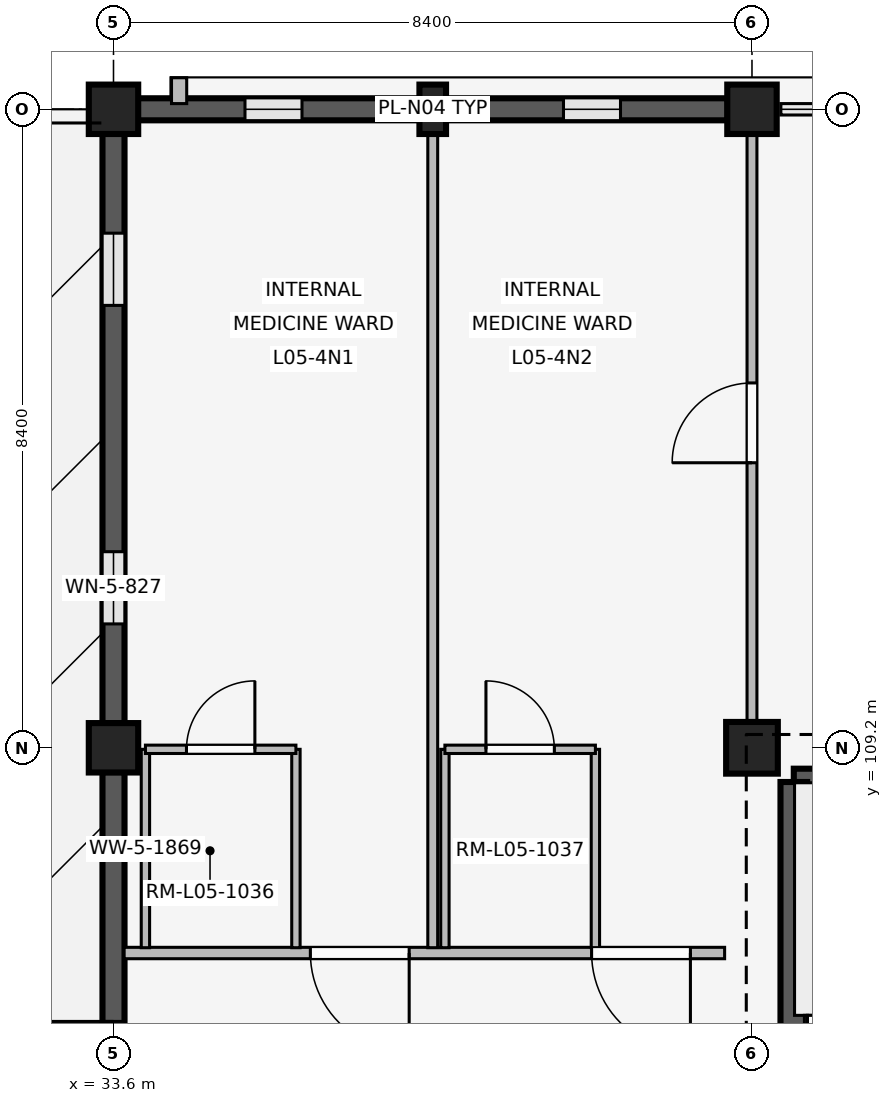
"""IFC4 building model, lengths in metres.
Left out: names, types, materials, properties, quantities, classifications, styles, units other than length and angle.
Written with IfcOpenShell. Run it as: python <this file> out.ifc"""

import sys

from ifc_helpers import new_model, si_unit, direction, frame, frame_2d, origin, origin_2d, place, context, subcontext, project, spatial, rectangle, extrude, element, fill, save


model = new_model("IFC4")
c1 = context("Model", 3, precision=1e-05, world=origin(), true_north=direction((0.0, 1.0)))
c2 = subcontext(c1, "Body", "Model", "MODEL_VIEW")
j1 = project(units=[si_unit("LENGTHUNIT", "METRE"), si_unit("PLANEANGLEUNIT", "RADIAN")], contexts=[c1])
p1 = place(None, origin())
s1 = spatial("IfcSite", under=j1, at=p1, CompositionType="ELEMENT")
p2 = place(p1, origin())
s2 = spatial("IfcBuilding", under=s1, at=p2, CompositionType="ELEMENT")
p3 = place(p2, frame((0.0, 0.0, 20.4)))
s3 = spatial("IfcBuildingStorey", under=s2, at=p3, CompositionType="ELEMENT", Elevation=20.4)
for number, where, z_axis, x_axis in (
    (1, (33.6, 109.2, 0.0), (0.0, 0.0, 1.0), (1.0, 0.0, 0.0)),
    (2, (33.6, 117.6, 0.0), (0.0, 0.0, 1.0), (1.0, 0.0, 0.0)),
):
    element("IfcColumn", number, at=place(p3, frame(where, z_axis=z_axis, x_axis=x_axis)), inside=s3, PredefinedType="COLUMN", context=c2, shape_type="SweptSolid", body=[
        extrude(rectangle(XDim=0.65, YDim=0.65, at=origin_2d()), origin(), (0.0, 0.0, 1.0), 4.2),
    ])
p4 = place(p3, frame((42.0, 109.2, 0.0), z_axis=(0.0, 0.0, 1.0), x_axis=(1.0, 0.0, 0.0)))
e3 = element("IfcColumn", 3, at=p4, inside=s3, PredefinedType="COLUMN", context=c2, shape_type="SweptSolid", body=[
    extrude(rectangle(XDim=0.68, YDim=0.68, at=origin_2d()), origin(), (0.0, 0.0, 1.0), 4.2),
])
p5 = place(p3, frame((42.0, 117.6, 0.0), z_axis=(0.0, 0.0, 1.0), x_axis=(1.0, 0.0, 0.0)))
e4 = element("IfcColumn", 4, at=p5, inside=s3, PredefinedType="COLUMN", context=c2, shape_type="SweptSolid", body=[
    extrude(rectangle(XDim=0.65, YDim=0.65, at=origin_2d()), origin(), (0.0, 0.0, 1.0), 4.2),
])
p6 = place(p3, frame((37.8, 117.6, 0.0), z_axis=(0.0, 0.0, 1.0), x_axis=(1.0, 0.0, 0.0)))
e5 = element("IfcColumn", 5, at=p6, inside=s3, PredefinedType="PILASTER", context=c2, shape_type="SweptSolid", body=[
    extrude(rectangle(XDim=0.35, YDim=0.65, at=origin_2d()), origin(), (0.0, 0.0, 1.0), 4.2),
])
p7 = place(p3, frame((33.6, 101.12, 0.0), z_axis=(0.0, 0.0, 1.0), x_axis=(0.0, 1.0, 0.0)))
e6 = element("IfcWall", 6, at=p7, inside=s3, PredefinedType="SOLIDWALL", context=c2, shape_type="SweptSolid", body=[
    extrude(rectangle(XDim=7.76, YDim=0.29, at=frame_2d((3.88, 0.0))), origin(), (0.0, 0.0, 1.0), 3.34),
])
p8 = place(p7, frame((3.28, 0.0, 0.0)))
e7 = element("IfcOpeningElement", 7, at=p8, cuts=e6, PredefinedType="OPENING", context=c2, shape_type="SweptSolid", body=[
    extrude(rectangle(XDim=1.2, YDim=2.25, at=frame_2d((0.6, 1.125))), frame((0.0, 0.155, 0.0), z_axis=(0.0, -1.0, 0.0), x_axis=(1.0, 0.0, 0.0)), (0.0, 0.0, 1.0), 0.31),
])
p9 = place(p3, frame((33.92, 117.6, 0.0), z_axis=(0.0, 0.0, 1.0), x_axis=(1.0, 0.0, 0.0)))
e8 = element("IfcWall", 8, at=p9, inside=s3, PredefinedType="SOLIDWALL", context=c2, shape_type="SweptSolid", body=[
    extrude(rectangle(XDim=7.76, YDim=0.29, at=frame_2d((3.88, 0.0))), origin(), (0.0, 0.0, 1.0), 3.34),
])
p10 = place(p9, frame((1.41, 0.0, 0.85)))
e9 = element("IfcOpeningElement", 9, at=p10, cuts=e8, PredefinedType="OPENING", context=c2, shape_type="SweptSolid", body=[
    extrude(rectangle(XDim=0.75, YDim=1.85, at=frame_2d((0.375, 0.925))), frame((0.0, 0.155, 0.0), z_axis=(0.0, -1.0, 0.0), x_axis=(1.0, 0.0, 0.0)), (0.0, 0.0, 1.0), 0.31),
])
p11 = place(p9, frame((5.6, 0.0, 0.85)))
e10 = element("IfcOpeningElement", 10, at=p11, cuts=e8, PredefinedType="OPENING", context=c2, shape_type="SweptSolid", body=[
    extrude(rectangle(XDim=0.75, YDim=1.85, at=frame_2d((0.375, 0.925))), frame((0.0, 0.155, 0.0), z_axis=(0.0, -1.0, 0.0), x_axis=(1.0, 0.0, 0.0)), (0.0, 0.0, 1.0), 0.31),
])
p12 = place(p3, frame((34.463, 117.675, 0.0), z_axis=(0.0, 0.0, 1.0), x_axis=(0.0, 1.0, 0.0)))
e11 = element("IfcWall", 11, at=p12, inside=s3, PredefinedType="ELEMENTEDWALL", context=c2, shape_type="SweptSolid", body=[
    extrude(rectangle(XDim=0.34, YDim=0.2, at=frame_2d((0.17, 0.0))), origin(), (0.0, 0.0, 1.0), 3.32),
])
p13 = place(p3, frame((33.6, 109.52, 0.0), z_axis=(0.0, 0.0, 1.0), x_axis=(0.0, 1.0, 0.0)))
e12 = element("IfcWall", 12, at=p13, inside=s3, PredefinedType="SOLIDWALL", context=c2, shape_type="SweptSolid", body=[
    extrude(rectangle(XDim=7.76, YDim=0.29, at=frame_2d((3.88, 0.0))), origin(), (0.0, 0.0, 1.0), 3.34),
])
p14 = place(p13, frame((1.31, 0.0, 0.85)))
e13 = element("IfcOpeningElement", 13, at=p14, cuts=e12, PredefinedType="OPENING", context=c2, shape_type="SweptSolid", body=[
    extrude(rectangle(XDim=0.95, YDim=1.6, at=frame_2d((0.475, 0.8))), frame((0.0, 0.155, 0.0), z_axis=(0.0, -1.0, 0.0), x_axis=(1.0, 0.0, 0.0)), (0.0, 0.0, 1.0), 0.31),
])
p15 = place(p13, frame((5.5, 0.0, 0.85)))
e14 = element("IfcOpeningElement", 14, at=p15, cuts=e12, PredefinedType="OPENING", context=c2, shape_type="SweptSolid", body=[
    extrude(rectangle(XDim=0.95, YDim=1.6, at=frame_2d((0.475, 0.8))), frame((0.0, 0.155, 0.0), z_axis=(0.0, -1.0, 0.0), x_axis=(1.0, 0.0, 0.0)), (0.0, 0.0, 1.0), 0.31),
])
p16 = place(p3, frame((42.55, 108.75, 0.0), z_axis=(0.0, 0.0, 1.0), x_axis=(1.0, 0.0, 0.0)))
e15 = element("IfcWall", 15, at=p16, inside=s3, PredefinedType="SHEAR", context=c2, shape_type="SweptSolid", body=[
    extrude(rectangle(XDim=7.5, YDim=0.35, at=frame_2d((3.75, 0.0))), origin(), (0.0, 0.0, 1.0), 3.92),
])
p17 = place(p3, frame((42.55, 101.2, 0.0), z_axis=(0.0, 0.0, 1.0), x_axis=(0.0, 1.0, 0.0)))
e16 = element("IfcWall", 16, at=p17, inside=s3, PredefinedType="SHEAR", context=c2, shape_type="SweptSolid", body=[
    extrude(rectangle(XDim=7.55, YDim=0.35, at=frame_2d((3.775, 0.0))), origin(), (0.0, 0.0, 1.0), 3.92),
])
p18 = place(p17, frame((0.28, 0.0, 0.0)))
e17 = element("IfcOpeningElement", 17, at=p18, cuts=e16, PredefinedType="OPENING", context=c2, shape_type="SweptSolid", body=[
    extrude(rectangle(XDim=1.0, YDim=2.15, at=frame_2d((0.5, 1.075))), frame((0.0, 0.185, 0.0), z_axis=(0.0, -1.0, 0.0), x_axis=(1.0, 0.0, 0.0)), (0.0, 0.0, 1.0), 0.37),
])
p19 = place(p3, frame((41.64, 106.5, 0.0), z_axis=(0.0, 0.0, 1.0), x_axis=(-1.0, 0.0, 0.0)))
e18 = element("IfcWall", 18, at=p19, inside=s3, PredefinedType="PARTITIONING", context=c2, shape_type="SweptSolid", body=[
    extrude(rectangle(XDim=7.9, YDim=0.15, at=frame_2d((3.95, 0.0))), origin(), (0.0, 0.0, 1.0), 3.32),
])
p20 = place(p19, frame((0.45, 0.0, 0.0)))
e19 = element("IfcOpeningElement", 19, at=p20, cuts=e18, PredefinedType="OPENING", context=c2, shape_type="SweptSolid", body=[
    extrude(rectangle(XDim=1.3, YDim=2.25, at=frame_2d((0.65, 1.125))), frame((0.0, 0.085, 0.0), z_axis=(0.0, -1.0, 0.0), x_axis=(1.0, 0.0, 0.0)), (0.0, 0.0, 1.0), 0.17),
])
p21 = place(p19, frame((4.15, 0.0, 0.0)))
e20 = element("IfcOpeningElement", 20, at=p21, cuts=e18, PredefinedType="OPENING", context=c2, shape_type="SweptSolid", body=[
    extrude(rectangle(XDim=1.3, YDim=2.25, at=frame_2d((0.65, 1.125))), frame((0.0, 0.085, 0.0), z_axis=(0.0, -1.0, 0.0), x_axis=(1.0, 0.0, 0.0)), (0.0, 0.0, 1.0), 0.17),
])
p22 = place(p3, frame((37.8, 106.57, 0.0), z_axis=(0.0, 0.0, 1.0), x_axis=(0.0, 1.0, 0.0)))
e21 = element("IfcWall", 21, at=p22, inside=s3, PredefinedType="PARTITIONING", context=c2, shape_type="SweptSolid", body=[
    extrude(rectangle(XDim=10.93, YDim=0.13, at=frame_2d((5.465, 0.0))), origin(), (0.0, 0.0, 1.0), 3.32),
])
for number, where, z_axis, x_axis in (
    (22, (34.02, 106.57, 0.0), (0.0, 0.0, 1.0), (0.0, 1.0, 0.0)),
    (23, (36.0, 106.57, 0.0), (0.0, 0.0, 1.0), (0.0, 1.0, 0.0)),
):
    element("IfcWall", number, at=place(p3, frame(where, z_axis=z_axis, x_axis=x_axis)), inside=s3, PredefinedType="PARTITIONING", context=c2, shape_type="SweptSolid", body=[
        extrude(rectangle(XDim=2.61, YDim=0.11, at=frame_2d((1.305, 0.0))), origin(), (0.0, 0.0, 1.0), 3.32),
    ])
p23 = place(p3, frame((34.02, 109.18, 0.0), z_axis=(0.0, 0.0, 1.0), x_axis=(1.0, 0.0, 0.0)))
e24 = element("IfcWall", 24, at=p23, inside=s3, PredefinedType="PARTITIONING", context=c2, shape_type="SweptSolid", body=[
    extrude(rectangle(XDim=1.98, YDim=0.11, at=frame_2d((0.99, 0.0))), origin(), (0.0, 0.0, 1.0), 3.32),
])
p24 = place(p23, frame((0.54, 0.0, 0.0)))
e25 = element("IfcOpeningElement", 25, at=p24, cuts=e24, PredefinedType="OPENING", context=c2, shape_type="SweptSolid", body=[
    extrude(rectangle(XDim=0.9, YDim=2.1, at=frame_2d((0.45, 1.05))), frame((0.0, 0.065, 0.0), z_axis=(0.0, -1.0, 0.0), x_axis=(1.0, 0.0, 0.0)), (0.0, 0.0, 1.0), 0.13),
])
for number, where, z_axis, x_axis in (
    (26, (37.96, 106.57, 0.0), (0.0, 0.0, 1.0), (0.0, 1.0, 0.0)),
    (27, (39.94, 106.57, 0.0), (0.0, 0.0, 1.0), (0.0, 1.0, 0.0)),
):
    element("IfcWall", number, at=place(p3, frame(where, z_axis=z_axis, x_axis=x_axis)), inside=s3, PredefinedType="PARTITIONING", context=c2, shape_type="SweptSolid", body=[
        extrude(rectangle(XDim=2.61, YDim=0.11, at=frame_2d((1.305, 0.0))), origin(), (0.0, 0.0, 1.0), 3.32),
    ])
p25 = place(p3, frame((37.96, 109.18, 0.0), z_axis=(0.0, 0.0, 1.0), x_axis=(1.0, 0.0, 0.0)))
e28 = element("IfcWall", 28, at=p25, inside=s3, PredefinedType="PARTITIONING", context=c2, shape_type="SweptSolid", body=[
    extrude(rectangle(XDim=1.98, YDim=0.11, at=frame_2d((0.99, 0.0))), origin(), (0.0, 0.0, 1.0), 3.32),
])
p26 = place(p25, frame((0.54, 0.0, 0.0)))
e29 = element("IfcOpeningElement", 29, at=p26, cuts=e28, PredefinedType="OPENING", context=c2, shape_type="SweptSolid", body=[
    extrude(rectangle(XDim=0.9, YDim=2.1, at=frame_2d((0.45, 1.05))), frame((0.0, 0.065, 0.0), z_axis=(0.0, -1.0, 0.0), x_axis=(1.0, 0.0, 0.0)), (0.0, 0.0, 1.0), 0.13),
])
p27 = place(p3, frame((42.0, 109.55, 0.0), z_axis=(0.0, 0.0, 1.0), x_axis=(0.0, 1.0, 0.0)))
e30 = element("IfcWall", 30, at=p27, inside=s3, PredefinedType="PARTITIONING", context=c2, shape_type="SweptSolid", body=[
    extrude(rectangle(XDim=7.91, YDim=0.13, at=frame_2d((3.955, 0.0))), origin(), (0.0, 0.0, 1.0), 3.32),
])
p28 = place(p27, frame((3.4, 0.0, 0.0)))
e31 = element("IfcOpeningElement", 31, at=p28, cuts=e30, PredefinedType="OPENING", context=c2, shape_type="SweptSolid", body=[
    extrude(rectangle(XDim=1.05, YDim=2.2, at=frame_2d((0.525, 1.1))), frame((0.0, 0.075, 0.0), z_axis=(0.0, -1.0, 0.0), x_axis=(1.0, 0.0, 0.0)), (0.0, 0.0, 1.0), 0.15),
])
p29 = place(p8, origin())
e32 = element("IfcDoor", 32, at=p29, inside=s3, OperationType="SINGLE_SWING_RIGHT", PredefinedType="DOOR", context=c2, shape_type="SweptSolid", body=[
    extrude(rectangle(XDim=1.2, YDim=2.25, at=frame_2d((0.6, 1.125))), frame((0.0, 0.025, 0.0), z_axis=(0.0, -1.0, 0.0), x_axis=(1.0, 0.0, 0.0)), (0.0, 0.0, 1.0), 0.05),
])
fill(e7, e32)
p30 = place(p10, origin())
e33 = element("IfcWindow", 33, at=p30, inside=s3, PartitioningType="SINGLE_PANEL", PredefinedType="WINDOW", context=c2, shape_type="SweptSolid", body=[
    extrude(rectangle(XDim=0.75, YDim=1.85, at=frame_2d((0.375, 0.925))), frame((0.0, 0.03, 0.0), z_axis=(0.0, -1.0, 0.0), x_axis=(1.0, 0.0, 0.0)), (0.0, 0.0, 1.0), 0.06),
])
fill(e9, e33)
p31 = place(p11, origin())
e34 = element("IfcWindow", 34, at=p31, inside=s3, PartitioningType="SINGLE_PANEL", PredefinedType="WINDOW", context=c2, shape_type="SweptSolid", body=[
    extrude(rectangle(XDim=0.75, YDim=1.85, at=frame_2d((0.375, 0.925))), frame((0.0, 0.03, 0.0), z_axis=(0.0, -1.0, 0.0), x_axis=(1.0, 0.0, 0.0)), (0.0, 0.0, 1.0), 0.06),
])
fill(e10, e34)
p32 = place(p14, origin())
e35 = element("IfcWindow", 35, at=p32, inside=s3, PartitioningType="SINGLE_PANEL", PredefinedType="WINDOW", context=c2, shape_type="SweptSolid", body=[
    extrude(rectangle(XDim=0.95, YDim=1.6, at=frame_2d((0.475, 0.8))), frame((0.0, 0.03, 0.0), z_axis=(0.0, -1.0, 0.0), x_axis=(1.0, 0.0, 0.0)), (0.0, 0.0, 1.0), 0.06),
])
fill(e13, e35)
p33 = place(p15, origin())
e36 = element("IfcWindow", 36, at=p33, inside=s3, PartitioningType="SINGLE_PANEL", PredefinedType="WINDOW", context=c2, shape_type="SweptSolid", body=[
    extrude(rectangle(XDim=0.95, YDim=1.6, at=frame_2d((0.475, 0.8))), frame((0.0, 0.03, 0.0), z_axis=(0.0, -1.0, 0.0), x_axis=(1.0, 0.0, 0.0)), (0.0, 0.0, 1.0), 0.06),
])
fill(e14, e36)
p34 = place(p20, origin())
e37 = element("IfcDoor", 37, at=p34, inside=s3, OperationType="SINGLE_SWING_LEFT", PredefinedType="DOOR", context=c2, shape_type="SweptSolid", body=[
    extrude(rectangle(XDim=1.3, YDim=2.25, at=frame_2d((0.65, 1.125))), frame((0.0, 0.025, 0.0), z_axis=(0.0, -1.0, 0.0), x_axis=(1.0, 0.0, 0.0)), (0.0, 0.0, 1.0), 0.05),
])
fill(e19, e37)
p35 = place(p21, origin())
e38 = element("IfcDoor", 38, at=p35, inside=s3, OperationType="SINGLE_SWING_LEFT", PredefinedType="DOOR", context=c2, shape_type="SweptSolid", body=[
    extrude(rectangle(XDim=1.3, YDim=2.25, at=frame_2d((0.65, 1.125))), frame((0.0, 0.025, 0.0), z_axis=(0.0, -1.0, 0.0), x_axis=(1.0, 0.0, 0.0)), (0.0, 0.0, 1.0), 0.05),
])
fill(e20, e38)
p36 = place(p24, origin())
e39 = element("IfcDoor", 39, at=p36, inside=s3, OperationType="SINGLE_SWING_RIGHT", PredefinedType="DOOR", context=c2, shape_type="SweptSolid", body=[
    extrude(rectangle(XDim=0.9, YDim=2.1, at=frame_2d((0.45, 1.05))), frame((0.0, 0.025, 0.0), z_axis=(0.0, -1.0, 0.0), x_axis=(1.0, 0.0, 0.0)), (0.0, 0.0, 1.0), 0.05),
])
fill(e25, e39)
p37 = place(p26, origin())
e40 = element("IfcDoor", 40, at=p37, inside=s3, OperationType="SINGLE_SWING_LEFT", PredefinedType="DOOR", context=c2, shape_type="SweptSolid", body=[
    extrude(rectangle(XDim=0.9, YDim=2.1, at=frame_2d((0.45, 1.05))), frame((0.0, 0.025, 0.0), z_axis=(0.0, -1.0, 0.0), x_axis=(1.0, 0.0, 0.0)), (0.0, 0.0, 1.0), 0.05),
])
fill(e29, e40)
p38 = place(p28, origin())
e41 = element("IfcDoor", 41, at=p38, inside=s3, OperationType="SINGLE_SWING_LEFT", PredefinedType="DOOR", context=c2, shape_type="SweptSolid", body=[
    extrude(rectangle(XDim=1.05, YDim=2.2, at=frame_2d((0.525, 1.1))), frame((0.0, 0.025, 0.0), z_axis=(0.0, -1.0, 0.0), x_axis=(1.0, 0.0, 0.0)), (0.0, 0.0, 1.0), 0.05),
])
fill(e31, e41)
save(model, sys.argv[1])
